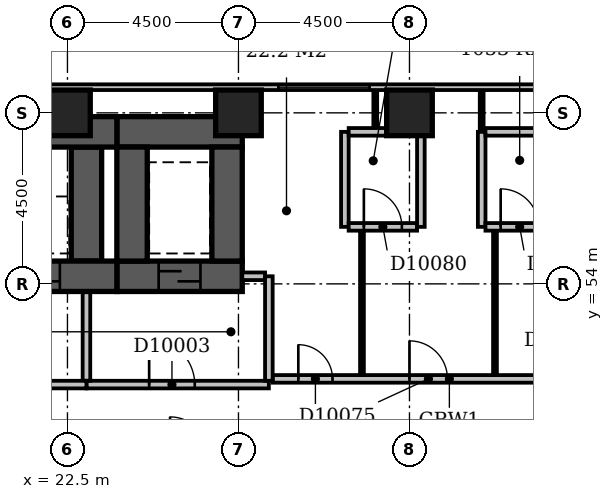
"""IFC4 building model, lengths in metres.
Left out: names, types, materials, properties, quantities, classifications, styles, units other than length and angle.
Written with IfcOpenShell. Run it as: python <this file> out.ifc"""

import sys

from ifc_helpers import new_model, si_unit, direction, frame, frame_2d, origin, origin_2d, place, context, subcontext, project, spatial, rectangle, extrude, element, fill, save


model = new_model("IFC4")
c1 = context("Model", 3, precision=1e-05, world=origin(), true_north=direction((0.0, 1.0)))
c2 = subcontext(c1, "Body", "Model", "MODEL_VIEW")
j1 = project(units=[si_unit("LENGTHUNIT", "METRE"), si_unit("PLANEANGLEUNIT", "RADIAN")], contexts=[c1])
p1 = place(None, origin())
s1 = spatial("IfcSite", under=j1, at=p1, CompositionType="ELEMENT")
p2 = place(p1, origin())
s2 = spatial("IfcBuilding", under=s1, at=p2, CompositionType="ELEMENT")
p3 = place(p2, frame((0.0, 0.0, 47.0)))
s3 = spatial("IfcBuildingStorey", under=s2, at=p3, CompositionType="ELEMENT", Elevation=47.0)
p4 = place(p3, frame((7.35, 54.2, -0.3), z_axis=(0.0, 0.0, 1.0), x_axis=(1.0, 0.0, 0.0)))
e1 = element("IfcWall", 1, at=p4, inside=s3, PredefinedType="SHEAR", context=c2, shape_type="SweptSolid", body=[
    extrude(rectangle(XDim=16.45, YDim=0.8, at=frame_2d((8.225, 0.0))), origin(), (0.0, 0.0, 1.0), 3.6),
])
p5 = place(p4, frame((1.35, 0.0, 0.3)))
e2 = element("IfcOpeningElement", 2, at=p5, cuts=e1, PredefinedType="OPENING", context=c2, shape_type="SweptSolid", body=[
    extrude(rectangle(XDim=1.1, YDim=2.1, at=frame_2d((0.55, 1.05))), frame((0.0, 0.412, 0.0), z_axis=(0.0, -1.0, 0.0), x_axis=(1.0, 0.0, 0.0)), (0.0, 0.0, 1.0), 0.824),
])
p6 = place(p4, frame((3.85, 0.0, 0.3)))
e3 = element("IfcOpeningElement", 3, at=p6, cuts=e1, PredefinedType="OPENING", context=c2, shape_type="SweptSolid", body=[
    extrude(rectangle(XDim=1.1, YDim=2.1, at=frame_2d((0.55, 1.05))), frame((0.0, 0.412, 0.0), z_axis=(0.0, -1.0, 0.0), x_axis=(1.0, 0.0, 0.0)), (0.0, 0.0, 1.0), 0.824),
])
p7 = place(p4, frame((6.35, 0.0, 0.3)))
e4 = element("IfcOpeningElement", 4, at=p7, cuts=e1, PredefinedType="OPENING", context=c2, shape_type="SweptSolid", body=[
    extrude(rectangle(XDim=1.1, YDim=2.1, at=frame_2d((0.55, 1.05))), frame((0.0, 0.412, 0.0), z_axis=(0.0, -1.0, 0.0), x_axis=(1.0, 0.0, 0.0)), (0.0, 0.0, 1.0), 0.824),
])
p8 = place(p4, frame((8.85, 0.0, 0.3)))
e5 = element("IfcOpeningElement", 5, at=p8, cuts=e1, PredefinedType="OPENING", context=c2, shape_type="SweptSolid", body=[
    extrude(rectangle(XDim=1.1, YDim=2.1, at=frame_2d((0.55, 1.05))), frame((0.0, 0.412, 0.0), z_axis=(0.0, -1.0, 0.0), x_axis=(1.0, 0.0, 0.0)), (0.0, 0.0, 1.0), 0.824),
])
p9 = place(p4, frame((11.35, 0.0, 0.3)))
e6 = element("IfcOpeningElement", 6, at=p9, cuts=e1, PredefinedType="OPENING", context=c2, shape_type="SweptSolid", body=[
    extrude(rectangle(XDim=1.1, YDim=2.1, at=frame_2d((0.55, 1.05))), frame((0.0, 0.412, 0.0), z_axis=(0.0, -1.0, 0.0), x_axis=(1.0, 0.0, 0.0)), (0.0, 0.0, 1.0), 0.824),
])
p10 = place(p4, frame((13.85, 0.0, 0.3)))
e7 = element("IfcOpeningElement", 7, at=p10, cuts=e1, PredefinedType="OPENING", context=c2, shape_type="SweptSolid", body=[
    extrude(rectangle(XDim=1.1, YDim=2.1, at=frame_2d((0.55, 1.05))), frame((0.0, 0.412, 0.0), z_axis=(0.0, -1.0, 0.0), x_axis=(1.0, 0.0, 0.0)), (0.0, 0.0, 1.0), 0.824),
])
p11 = place(p3, frame((7.35, 58.0, -0.3), z_axis=(0.0, 0.0, 1.0), x_axis=(1.0, 0.0, 0.0)))
e8 = element("IfcWall", 8, at=p11, inside=s3, PredefinedType="SHEAR", context=c2, shape_type="SweptSolid", body=[
    extrude(rectangle(XDim=16.45, YDim=0.8, at=frame_2d((8.225, 0.0))), origin(), (0.0, 0.0, 1.0), 3.6),
])
p12 = place(p3, frame((23.0, 54.6, -0.3), z_axis=(0.0, 0.0, 1.0), x_axis=(0.0, 1.0, 0.0)))
e9 = element("IfcWall", 9, at=p12, inside=s3, PredefinedType="SHEAR", context=c2, shape_type="SweptSolid", body=[
    extrude(rectangle(XDim=3.0, YDim=0.8, at=frame_2d((1.5, 0.0))), origin(), (0.0, 0.0, 1.0), 3.6),
])
p13 = place(p3, frame((23.8, 54.2, -0.3), z_axis=(0.0, 0.0, 1.0), x_axis=(1.0, 0.0, 0.0)))
e10 = element("IfcWall", 10, at=p13, inside=s3, PredefinedType="SHEAR", context=c2, shape_type="SweptSolid", body=[
    extrude(rectangle(XDim=3.3, YDim=0.8, at=frame_2d((1.65, 0.0))), origin(), (0.0, 0.0, 1.0), 3.6),
])
p14 = place(p13, frame((1.1, 0.0, 0.3)))
e11 = element("IfcOpeningElement", 11, at=p14, cuts=e10, PredefinedType="OPENING", context=c2, shape_type="SweptSolid", body=[
    extrude(rectangle(XDim=1.1, YDim=2.1, at=frame_2d((0.55, 1.05))), frame((0.0, 0.412, 0.0), z_axis=(0.0, -1.0, 0.0), x_axis=(1.0, 0.0, 0.0)), (0.0, 0.0, 1.0), 0.824),
])
p15 = place(p3, frame((23.8, 58.0, -0.3), z_axis=(0.0, 0.0, 1.0), x_axis=(1.0, 0.0, 0.0)))
e12 = element("IfcWall", 12, at=p15, inside=s3, PredefinedType="SHEAR", context=c2, shape_type="SweptSolid", body=[
    extrude(rectangle(XDim=3.3, YDim=0.8, at=frame_2d((1.65, 0.0))), origin(), (0.0, 0.0, 1.0), 3.6),
])
for number, where, z_axis, x_axis in (
    (13, (24.2, 54.6, -0.3), (0.0, 0.0, 1.0), (0.0, 1.0, 0.0)),
    (14, (26.7, 54.6, -0.3), (0.0, 0.0, 1.0), (0.0, 1.0, 0.0)),
):
    element("IfcWall", number, at=place(p3, frame(where, z_axis=z_axis, x_axis=x_axis)), inside=s3, PredefinedType="SHEAR", context=c2, shape_type="SweptSolid", body=[
        extrude(rectangle(XDim=3.0, YDim=0.8, at=frame_2d((1.5, 0.0))), origin(), (0.0, 0.0, 1.0), 3.6),
    ])
for number, where, z_axis, x_axis in (
    (15, (22.5, 58.5, -0.3), (0.0, 0.0, 1.0), (1.0, 0.0, 0.0)),
    (16, (27.0, 58.5, -0.3), (0.0, 0.0, 1.0), (1.0, 0.0, 0.0)),
    (17, (31.5, 58.5, -0.3), (0.0, 0.0, 1.0), (1.0, 0.0, 0.0)),
):
    element("IfcColumn", number, at=place(p3, frame(where, z_axis=z_axis, x_axis=x_axis)), inside=s3, PredefinedType="COLUMN", context=c2, shape_type="SweptSolid", body=[
        extrude(rectangle(XDim=1.2, YDim=1.2, at=origin_2d()), origin(), (0.0, 0.0, 1.0), 3.6),
    ])
p16 = place(p3, frame((68.1, 59.175, 0.0), z_axis=(0.0, 0.0, 1.0), x_axis=(-1.0, 0.0, 0.0)))
e18 = element("IfcWall", 18, at=p16, inside=s3, PredefinedType="STANDARD", context=c2, shape_type="SweptSolid", body=[
    extrude(rectangle(XDim=68.85, YDim=0.15, at=frame_2d((34.425, 0.0))), origin(), (0.0, 0.0, 1.0), 2.7),
])
p17 = place(p16, frame((2.67, 0.0, 0.6)))
e19 = element("IfcOpeningElement", 19, at=p17, cuts=e18, PredefinedType="OPENING", context=c2, shape_type="SweptSolid", body=[
    extrude(rectangle(XDim=1.5, YDim=1.8, at=frame_2d((0.75, 0.9))), frame((0.0, 0.087, 0.0), z_axis=(0.0, -1.0, 0.0), x_axis=(1.0, 0.0, 0.0)), (0.0, 0.0, 1.0), 0.174),
])
p18 = place(p16, frame((6.15, 0.0, 0.6)))
e20 = element("IfcOpeningElement", 20, at=p18, cuts=e18, PredefinedType="OPENING", context=c2, shape_type="SweptSolid", body=[
    extrude(rectangle(XDim=2.4, YDim=1.8, at=frame_2d((1.2, 0.9))), frame((0.0, 0.087, 0.0), z_axis=(0.0, -1.0, 0.0), x_axis=(1.0, 0.0, 0.0)), (0.0, 0.0, 1.0), 0.174),
])
p19 = place(p16, frame((37.65, 0.0, 0.6)))
e21 = element("IfcOpeningElement", 21, at=p19, cuts=e18, PredefinedType="OPENING", context=c2, shape_type="SweptSolid", body=[
    extrude(rectangle(XDim=2.4, YDim=1.8, at=frame_2d((1.2, 0.9))), frame((0.0, 0.087, 0.0), z_axis=(0.0, -1.0, 0.0), x_axis=(1.0, 0.0, 0.0)), (0.0, 0.0, 1.0), 0.174),
])
p20 = place(p3, frame((8.0, 51.35, 0.0), z_axis=(0.0, 0.0, 1.0), x_axis=(1.0, 0.0, 0.0)))
e22 = element("IfcWall", 22, at=p20, inside=s3, PredefinedType="PARTITIONING", context=c2, shape_type="SweptSolid", body=[
    extrude(rectangle(XDim=15.0, YDim=0.2, at=frame_2d((7.5, 0.0))), origin(), (0.0, 0.0, 1.0), 3.3),
])
p21 = place(p20, frame((3.4, 0.0, 0.0)))
e23 = element("IfcOpeningElement", 23, at=p21, cuts=e22, PredefinedType="OPENING", context=c2, shape_type="SweptSolid", body=[
    extrude(rectangle(XDim=1.2, YDim=2.1, at=frame_2d((0.6, 1.05))), frame((0.0, 0.112, 0.0), z_axis=(0.0, -1.0, 0.0), x_axis=(1.0, 0.0, 0.0)), (0.0, 0.0, 1.0), 0.224),
])
p22 = place(p20, frame((9.4, 0.0, 0.0)))
e24 = element("IfcOpeningElement", 24, at=p22, cuts=e22, PredefinedType="OPENING", context=c2, shape_type="SweptSolid", body=[
    extrude(rectangle(XDim=1.2, YDim=2.1, at=frame_2d((0.6, 1.05))), frame((0.0, 0.112, 0.0), z_axis=(0.0, -1.0, 0.0), x_axis=(1.0, 0.0, 0.0)), (0.0, 0.0, 1.0), 0.224),
])
p23 = place(p3, frame((23.0, 51.45, 0.0), z_axis=(0.0, 0.0, 1.0), x_axis=(0.0, 1.0, 0.0)))
e25 = element("IfcWall", 25, at=p23, inside=s3, PredefinedType="PARTITIONING", context=c2, shape_type="SweptSolid", body=[
    extrude(rectangle(XDim=2.33, YDim=0.2, at=frame_2d((1.165, 0.0))), origin(), (0.0, 0.0, 1.0), 3.3),
])
p24 = place(p3, frame((23.0, 51.35, 0.0), z_axis=(0.0, 0.0, 1.0), x_axis=(1.0, 0.0, 0.0)))
e26 = element("IfcWall", 26, at=p24, inside=s3, PredefinedType="PARTITIONING", context=c2, shape_type="SweptSolid", body=[
    extrude(rectangle(XDim=4.8, YDim=0.2, at=frame_2d((2.4, 0.0))), origin(), (0.0, 0.0, 1.0), 3.3),
])
p25 = place(p24, frame((1.65, 0.0, 0.0)))
e27 = element("IfcOpeningElement", 27, at=p25, cuts=e26, PredefinedType="OPENING", context=c2, shape_type="SweptSolid", body=[
    extrude(rectangle(XDim=1.2, YDim=2.1, at=frame_2d((0.6, 1.05))), frame((0.0, 0.112, 0.0), z_axis=(0.0, -1.0, 0.0), x_axis=(1.0, 0.0, 0.0)), (0.0, 0.0, 1.0), 0.224),
])
p26 = place(p3, frame((27.8, 51.45, 0.0), z_axis=(0.0, 0.0, 1.0), x_axis=(0.0, 1.0, 0.0)))
e28 = element("IfcWall", 28, at=p26, inside=s3, PredefinedType="PARTITIONING", context=c2, shape_type="SweptSolid", body=[
    extrude(rectangle(XDim=2.75, YDim=0.2, at=frame_2d((1.375, 0.0))), origin(), (0.0, 0.0, 1.0), 3.3),
])
p27 = place(p3, frame((27.1, 54.2, 0.0), z_axis=(0.0, 0.0, 1.0), x_axis=(1.0, 0.0, 0.0)))
e29 = element("IfcWall", 29, at=p27, inside=s3, PredefinedType="PARTITIONING", context=c2, shape_type="SweptSolid", body=[
    extrude(rectangle(XDim=0.6, YDim=0.2, at=frame_2d((0.3, 0.0))), origin(), (0.0, 0.0, 1.0), 3.3),
])
p28 = place(p3, frame((27.9, 51.5, 0.0), z_axis=(0.0, 0.0, 1.0), x_axis=(1.0, 0.0, 0.0)))
e30 = element("IfcWall", 30, at=p28, inside=s3, PredefinedType="PARTITIONING", context=c2, shape_type="SweptSolid", body=[
    extrude(rectangle(XDim=9.3, YDim=0.2, at=frame_2d((4.65, 0.0))), origin(), (0.0, 0.0, 1.0), 3.3),
])
p29 = place(p28, frame((0.675, 0.0, 0.0)))
e31 = element("IfcOpeningElement", 31, at=p29, cuts=e30, PredefinedType="OPENING", context=c2, shape_type="SweptSolid", body=[
    extrude(rectangle(XDim=0.9, YDim=2.1, at=frame_2d((0.45, 1.05))), frame((0.0, 0.112, 0.0), z_axis=(0.0, -1.0, 0.0), x_axis=(1.0, 0.0, 0.0)), (0.0, 0.0, 1.0), 0.224),
])
p30 = place(p28, frame((3.6, 0.0, 0.0)))
e32 = element("IfcOpeningElement", 32, at=p30, cuts=e30, PredefinedType="OPENING", context=c2, shape_type="SweptSolid", body=[
    extrude(rectangle(XDim=1.0, YDim=2.1, at=frame_2d((0.5, 1.05))), frame((0.0, 0.112, 0.0), z_axis=(0.0, -1.0, 0.0), x_axis=(1.0, 0.0, 0.0)), (0.0, 0.0, 1.0), 0.224),
])
p31 = place(p28, frame((7.125, 0.0, 0.0)))
e33 = element("IfcOpeningElement", 33, at=p31, cuts=e30, PredefinedType="OPENING", context=c2, shape_type="SweptSolid", body=[
    extrude(rectangle(XDim=1.0, YDim=2.1, at=frame_2d((0.5, 1.05))), frame((0.0, 0.112, 0.0), z_axis=(0.0, -1.0, 0.0), x_axis=(1.0, 0.0, 0.0)), (0.0, 0.0, 1.0), 0.224),
])
for number, where, z_axis, x_axis in (
    (34, (30.25, 51.6, 0.0), (0.0, 0.0, 1.0), (0.0, 1.0, 0.0)),
    (35, (33.75, 51.6, 0.0), (0.0, 0.0, 1.0), (0.0, 1.0, 0.0)),
):
    element("IfcWall", number, at=place(p3, frame(where, z_axis=z_axis, x_axis=x_axis)), inside=s3, PredefinedType="PARTITIONING", context=c2, shape_type="SweptSolid", body=[
        extrude(rectangle(XDim=3.8, YDim=0.1, at=frame_2d((1.9, 0.0))), origin(), (0.0, 0.0, 1.0), 3.3),
    ])
p32 = place(p3, frame((29.8, 55.5, 0.0), z_axis=(0.0, 0.0, 1.0), x_axis=(0.0, 1.0, 0.0)))
e36 = element("IfcWall", 36, at=p32, inside=s3, PredefinedType="PARTITIONING", context=c2, shape_type="SweptSolid", body=[
    extrude(rectangle(XDim=2.5, YDim=0.2, at=frame_2d((1.25, 0.0))), origin(), (0.0, 0.0, 1.0), 3.3),
])
p33 = place(p3, frame((29.9, 55.5, 0.0), z_axis=(0.0, 0.0, 1.0), x_axis=(1.0, 0.0, 0.0)))
e37 = element("IfcWall", 37, at=p33, inside=s3, PredefinedType="PARTITIONING", context=c2, shape_type="SweptSolid", body=[
    extrude(rectangle(XDim=1.8, YDim=0.2, at=frame_2d((0.9, 0.0))), origin(), (0.0, 0.0, 1.0), 3.3),
])
p34 = place(p33, frame((0.4, 0.0, 0.0)))
e38 = element("IfcOpeningElement", 38, at=p34, cuts=e37, PredefinedType="OPENING", context=c2, shape_type="SweptSolid", body=[
    extrude(rectangle(XDim=1.0, YDim=2.1, at=frame_2d((0.5, 1.05))), frame((0.0, 0.112, 0.0), z_axis=(0.0, -1.0, 0.0), x_axis=(1.0, 0.0, 0.0)), (0.0, 0.0, 1.0), 0.224),
])
for number, where, z_axis, x_axis in (
    (39, (31.8, 55.5, 0.0), (0.0, 0.0, 1.0), (0.0, 1.0, 0.0)),
    (40, (33.4, 55.5, 0.0), (0.0, 0.0, 1.0), (0.0, 1.0, 0.0)),
):
    element("IfcWall", number, at=place(p3, frame(where, z_axis=z_axis, x_axis=x_axis)), inside=s3, PredefinedType="PARTITIONING", context=c2, shape_type="SweptSolid", body=[
        extrude(rectangle(XDim=2.5, YDim=0.2, at=frame_2d((1.25, 0.0))), origin(), (0.0, 0.0, 1.0), 3.3),
    ])
p35 = place(p3, frame((33.5, 55.5, 0.0), z_axis=(0.0, 0.0, 1.0), x_axis=(1.0, 0.0, 0.0)))
e41 = element("IfcWall", 41, at=p35, inside=s3, PredefinedType="PARTITIONING", context=c2, shape_type="SweptSolid", body=[
    extrude(rectangle(XDim=1.8, YDim=0.2, at=frame_2d((0.9, 0.0))), origin(), (0.0, 0.0, 1.0), 3.3),
])
p36 = place(p35, frame((0.4, 0.0, 0.0)))
e42 = element("IfcOpeningElement", 42, at=p36, cuts=e41, PredefinedType="OPENING", context=c2, shape_type="SweptSolid", body=[
    extrude(rectangle(XDim=1.0, YDim=2.1, at=frame_2d((0.5, 1.05))), frame((0.0, 0.112, 0.0), z_axis=(0.0, -1.0, 0.0), x_axis=(1.0, 0.0, 0.0)), (0.0, 0.0, 1.0), 0.224),
])
p37 = place(p3, frame((29.9, 58.0, 0.0), z_axis=(0.0, 0.0, 1.0), x_axis=(1.0, 0.0, 0.0)))
e43 = element("IfcWall", 43, at=p37, inside=s3, PredefinedType="PARTITIONING", context=c2, shape_type="SweptSolid", body=[
    extrude(rectangle(XDim=1.8, YDim=0.2, at=frame_2d((0.9, 0.0))), origin(), (0.0, 0.0, 1.0), 3.3),
])
p38 = place(p3, frame((33.4, 58.0, 0.0), z_axis=(0.0, 0.0, 1.0), x_axis=(0.0, 1.0, 0.0)))
e44 = element("IfcWall", 44, at=p38, inside=s3, PredefinedType="PARTITIONING", context=c2, shape_type="SweptSolid", body=[
    extrude(rectangle(XDim=1.1, YDim=0.1, at=frame_2d((0.55, 0.0))), origin(), (0.0, 0.0, 1.0), 3.3),
])
p39 = place(p3, frame((33.5, 58.0, 0.0), z_axis=(0.0, 0.0, 1.0), x_axis=(1.0, 0.0, 0.0)))
e45 = element("IfcWall", 45, at=p39, inside=s3, PredefinedType="PARTITIONING", context=c2, shape_type="SweptSolid", body=[
    extrude(rectangle(XDim=1.8, YDim=0.2, at=frame_2d((0.9, 0.0))), origin(), (0.0, 0.0, 1.0), 3.3),
])
p40 = place(p3, frame((30.6, 58.1, 0.0), z_axis=(0.0, 0.0, 1.0), x_axis=(0.0, 1.0, 0.0)))
e46 = element("IfcWall", 46, at=p40, inside=s3, PredefinedType="PARTITIONING", context=c2, shape_type="SweptSolid", body=[
    extrude(rectangle(XDim=1.0, YDim=0.1, at=frame_2d((0.5, 0.0))), origin(), (0.0, 0.0, 1.0), 3.3),
])
p41 = place(p19, origin())
e47 = element("IfcWindow", 47, at=p41, inside=s3, PartitioningType="SINGLE_PANEL", PredefinedType="WINDOW", context=c2, shape_type="SweptSolid", body=[
    extrude(rectangle(XDim=2.4, YDim=1.8, at=frame_2d((1.2, 0.9))), frame((0.0, 0.03, 0.0), z_axis=(0.0, -1.0, 0.0), x_axis=(1.0, 0.0, 0.0)), (0.0, 0.0, 1.0), 0.06),
])
fill(e21, e47)
p42 = place(p25, origin())
e48 = element("IfcDoor", 48, at=p42, inside=s3, OperationType="SINGLE_SWING_LEFT", PredefinedType="DOOR", context=c2, shape_type="SweptSolid", body=[
    extrude(rectangle(XDim=1.2, YDim=2.1, at=frame_2d((0.6, 1.05))), frame((0.0, 0.025, 0.0), z_axis=(0.0, -1.0, 0.0), x_axis=(1.0, 0.0, 0.0)), (0.0, 0.0, 1.0), 0.05),
])
fill(e27, e48)
p43 = place(p14, origin())
e49 = element("IfcDoor", 49, at=p43, inside=s3, OperationType="SLIDING_TO_LEFT", PredefinedType="DOOR", context=c2, shape_type="SweptSolid", body=[
    extrude(rectangle(XDim=1.1, YDim=2.1, at=frame_2d((0.55, 1.05))), frame((0.0, 0.025, 0.0), z_axis=(0.0, -1.0, 0.0), x_axis=(1.0, 0.0, 0.0)), (0.0, 0.0, 1.0), 0.05),
])
fill(e11, e49)
p44 = place(p10, origin())
e50 = element("IfcDoor", 50, at=p44, inside=s3, OperationType="SLIDING_TO_LEFT", PredefinedType="DOOR", context=c2, shape_type="SweptSolid", body=[
    extrude(rectangle(XDim=1.1, YDim=2.1, at=frame_2d((0.55, 1.05))), frame((0.0, 0.025, 0.0), z_axis=(0.0, -1.0, 0.0), x_axis=(1.0, 0.0, 0.0)), (0.0, 0.0, 1.0), 0.05),
])
fill(e7, e50)
p45 = place(p29, origin())
e51 = element("IfcDoor", 51, at=p45, inside=s3, OperationType="SINGLE_SWING_LEFT", PredefinedType="DOOR", context=c2, shape_type="SweptSolid", body=[
    extrude(rectangle(XDim=0.9, YDim=2.1, at=frame_2d((0.45, 1.05))), frame((0.0, 0.025, 0.0), z_axis=(0.0, -1.0, 0.0), x_axis=(1.0, 0.0, 0.0)), (0.0, 0.0, 1.0), 0.05),
])
fill(e31, e51)
p46 = place(p30, origin())
e52 = element("IfcDoor", 52, at=p46, inside=s3, OperationType="SINGLE_SWING_LEFT", PredefinedType="DOOR", context=c2, shape_type="SweptSolid", body=[
    extrude(rectangle(XDim=1.0, YDim=2.1, at=frame_2d((0.5, 1.05))), frame((0.0, 0.025, 0.0), z_axis=(0.0, -1.0, 0.0), x_axis=(1.0, 0.0, 0.0)), (0.0, 0.0, 1.0), 0.05),
])
fill(e32, e52)
p47 = place(p34, origin())
e53 = element("IfcDoor", 53, at=p47, inside=s3, OperationType="SINGLE_SWING_LEFT", PredefinedType="DOOR", context=c2, shape_type="SweptSolid", body=[
    extrude(rectangle(XDim=1.0, YDim=2.1, at=frame_2d((0.5, 1.05))), frame((0.0, 0.025, 0.0), z_axis=(0.0, -1.0, 0.0), x_axis=(1.0, 0.0, 0.0)), (0.0, 0.0, 1.0), 0.05),
])
fill(e38, e53)
p48 = place(p36, origin())
e54 = element("IfcDoor", 54, at=p48, inside=s3, OperationType="SINGLE_SWING_LEFT", PredefinedType="DOOR", context=c2, shape_type="SweptSolid", body=[
    extrude(rectangle(XDim=1.0, YDim=2.1, at=frame_2d((0.5, 1.05))), frame((0.0, 0.025, 0.0), z_axis=(0.0, -1.0, 0.0), x_axis=(1.0, 0.0, 0.0)), (0.0, 0.0, 1.0), 0.05),
])
fill(e42, e54)
save(model, sys.argv[1])
